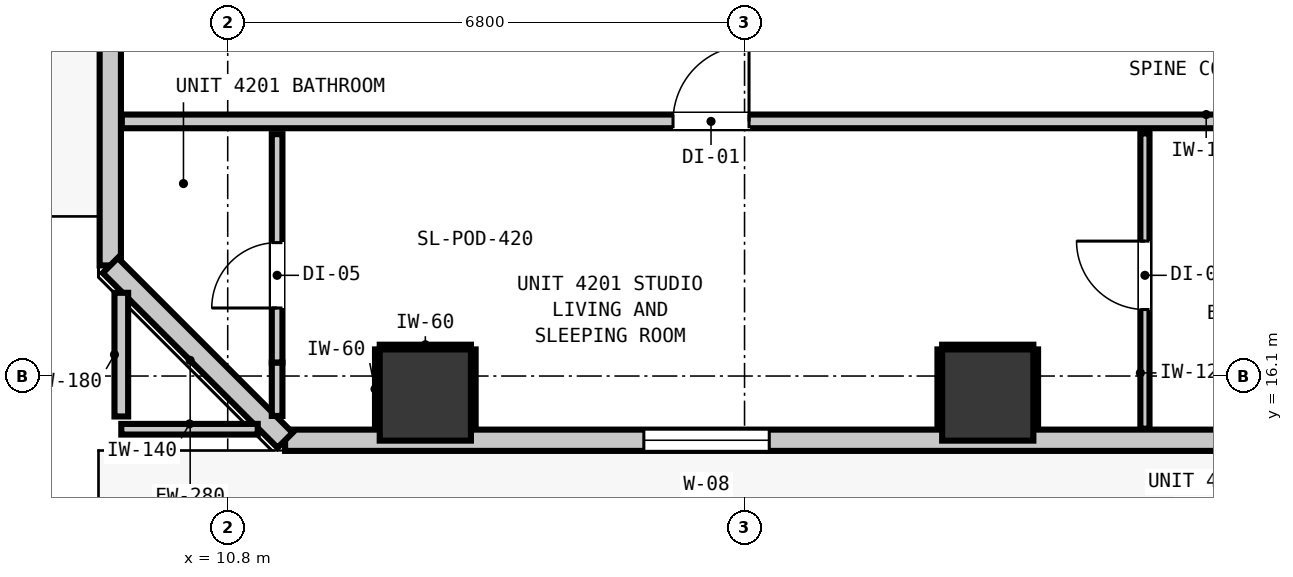
"""IFC4 building model, lengths in metres.
Left out: names, types, materials, properties, quantities, classifications, styles, units other than length and angle.
Written with IfcOpenShell. Run it as: python <this file> out.ifc"""

import sys

from ifc_helpers import new_model, si_unit, direction, frame, frame_2d, origin, origin_2d, place, context, subcontext, project, spatial, rectangle, extrude, element, fill, save


model = new_model("IFC4")
c1 = context("Model", 3, precision=1e-05, world=origin(), true_north=direction((0.0, 1.0)))
c2 = subcontext(c1, "Body", "Model", "MODEL_VIEW")
j1 = project(units=[si_unit("LENGTHUNIT", "METRE"), si_unit("PLANEANGLEUNIT", "RADIAN")], contexts=[c1])
p1 = place(None, origin())
s1 = spatial("IfcSite", under=j1, at=p1, CompositionType="ELEMENT")
p2 = place(p1, origin())
s2 = spatial("IfcBuilding", under=s1, at=p2, CompositionType="ELEMENT")
p3 = place(p2, frame((0.0, 0.0, 145.92)))
s3 = spatial("IfcBuildingStorey", under=s2, at=p3, CompositionType="ELEMENT", Elevation=145.92)
for number, where, z_axis, x_axis in (
    (1, (13.4, 15.85, -0.2), (0.0, 0.0, 1.0), (1.0, 0.0, 0.0)),
    (2, (20.8, 15.85, -0.2), (0.0, 0.0, 1.0), (1.0, 0.0, 0.0)),
):
    element("IfcColumn", number, at=place(p3, frame(where, z_axis=z_axis, x_axis=x_axis)), inside=s3, PredefinedType="COLUMN", context=c2, shape_type="SweptSolid", body=[
        extrude(rectangle(XDim=1.2, YDim=1.2, at=origin_2d()), origin(), (0.0, 0.0, 1.0), 3.52),
    ])
p4 = place(p3, frame((9.255, 17.555, 0.0), z_axis=(0.0, 0.0, 1.0), x_axis=(0.0, 1.0, 0.0)))
e3 = element("IfcWall", 3, at=p4, inside=s3, PredefinedType="STANDARD", context=c2, shape_type="SweptSolid", body=[
    extrude(rectangle(XDim=32.29, YDim=0.28, at=frame_2d((16.145, 0.0))), origin(), (0.0, 0.0, 1.0), 3.08),
])
p5 = place(p4, frame((5.467, 0.0, 0.0)))
e4 = element("IfcOpeningElement", 4, at=p5, cuts=e3, PredefinedType="OPENING", context=c2, shape_type="SweptSolid", body=[
    extrude(rectangle(XDim=1.0, YDim=2.15, at=frame_2d((0.5, 1.075))), frame((0.0, 0.15, 0.0), z_axis=(0.0, -1.0, 0.0), x_axis=(1.0, 0.0, 0.0)), (0.0, 0.0, 1.0), 0.3),
])
p6 = place(p4, frame((30.753, 0.0, 0.85)))
e5 = element("IfcOpeningElement", 5, at=p6, cuts=e3, PredefinedType="OPENING", context=c2, shape_type="SweptSolid", body=[
    extrude(rectangle(XDim=1.05, YDim=1.65, at=frame_2d((0.525, 0.825))), frame((0.0, 0.15, 0.0), z_axis=(0.0, -1.0, 0.0), x_axis=(1.0, 0.0, 0.0)), (0.0, 0.0, 1.0), 0.3),
])
p7 = place(p3, frame((46.645, 15.255, 0.0), z_axis=(0.0, 0.0, 1.0), x_axis=(-1.0, 0.0, 0.0)))
e6 = element("IfcWall", 6, at=p7, inside=s3, PredefinedType="STANDARD", context=c2, shape_type="SweptSolid", body=[
    extrude(rectangle(XDim=35.09, YDim=0.28, at=frame_2d((17.545, 0.0))), origin(), (0.0, 0.0, 1.0), 3.08),
])
p8 = place(p7, frame((0.503, 0.0, 0.0)))
e7 = element("IfcOpeningElement", 7, at=p8, cuts=e6, PredefinedType="OPENING", context=c2, shape_type="SweptSolid", body=[
    extrude(rectangle(XDim=1.1, YDim=2.15, at=frame_2d((0.55, 1.075))), frame((0.0, 0.15, 0.0), z_axis=(0.0, -1.0, 0.0), x_axis=(1.0, 0.0, 0.0)), (0.0, 0.0, 1.0), 0.3),
])
p9 = place(p7, frame((28.72, 0.0, 0.85)))
e8 = element("IfcOpeningElement", 8, at=p9, cuts=e6, PredefinedType="OPENING", context=c2, shape_type="SweptSolid", body=[
    extrude(rectangle(XDim=1.65, YDim=1.75, at=frame_2d((0.825, 0.875))), frame((0.0, 0.15, 0.0), z_axis=(0.0, -1.0, 0.0), x_axis=(1.0, 0.0, 0.0)), (0.0, 0.0, 1.0), 0.3),
])
p10 = place(p7, frame((14.635, 0.0, 0.85)))
e9 = element("IfcOpeningElement", 9, at=p10, cuts=e6, PredefinedType="OPENING", context=c2, shape_type="SweptSolid", body=[
    extrude(rectangle(XDim=1.65, YDim=1.75, at=frame_2d((0.825, 0.875))), frame((0.0, 0.15, 0.0), z_axis=(0.0, -1.0, 0.0), x_axis=(1.0, 0.0, 0.0)), (0.0, 0.0, 1.0), 0.3),
])
p11 = place(p7, frame((4.309, 0.0, 0.85)))
e10 = element("IfcOpeningElement", 10, at=p11, cuts=e6, PredefinedType="OPENING", context=c2, shape_type="SweptSolid", body=[
    extrude(rectangle(XDim=1.65, YDim=1.75, at=frame_2d((0.825, 0.875))), frame((0.0, 0.15, 0.0), z_axis=(0.0, -1.0, 0.0), x_axis=(1.0, 0.0, 0.0)), (0.0, 0.0, 1.0), 0.3),
])
p12 = place(p3, frame((11.555, 15.255, 0.0), z_axis=(0.0, 0.0, 1.0), x_axis=(-0.707106781187, 0.707106781187, 0.0)))
e11 = element("IfcWall", 11, at=p12, inside=s3, PredefinedType="STANDARD", context=c2, shape_type="SweptSolid", body=[
    extrude(rectangle(XDim=3.253, YDim=0.28, at=frame_2d((1.626, 0.0))), origin(), (0.0, 0.0, 1.0), 3.08),
])
p13 = place(p3, frame((9.407, 19.45, 0.0), z_axis=(0.0, 0.0, 1.0), x_axis=(1.0, 0.0, 0.0)))
e12 = element("IfcWall", 12, at=p13, inside=s3, PredefinedType="PARTITIONING", context=c2, shape_type="SweptSolid", body=[
    extrude(rectangle(XDim=27.532, YDim=0.18, at=frame_2d((13.766, 0.0))), origin(), (0.0, 0.0, 1.0), 3.08),
])
p14 = place(p13, frame((7.252, 0.0, 0.0)))
e13 = element("IfcOpeningElement", 13, at=p14, cuts=e12, PredefinedType="OPENING", context=c2, shape_type="SweptSolid", body=[
    extrude(rectangle(XDim=1.0, YDim=2.15, at=frame_2d((0.5, 1.075))), frame((0.0, 0.1, 0.0), z_axis=(0.0, -1.0, 0.0), x_axis=(1.0, 0.0, 0.0)), (0.0, 0.0, 1.0), 0.2),
])
p15 = place(p13, frame((20.282, 0.0, 0.0)))
e14 = element("IfcOpeningElement", 14, at=p15, cuts=e12, PredefinedType="OPENING", context=c2, shape_type="SweptSolid", body=[
    extrude(rectangle(XDim=1.0, YDim=2.15, at=frame_2d((0.5, 1.075))), frame((0.0, 0.1, 0.0), z_axis=(0.0, -1.0, 0.0), x_axis=(1.0, 0.0, 0.0)), (0.0, 0.0, 1.0), 0.2),
])
p16 = place(p3, frame((9.4, 15.4, 0.0), z_axis=(0.0, 0.0, 1.0), x_axis=(1.0, 0.0, 0.0)))
e15 = element("IfcWall", 15, at=p16, inside=s3, PredefinedType="PARTITIONING", context=c2, shape_type="SweptSolid", body=[
    extrude(rectangle(XDim=1.795, YDim=0.14, at=frame_2d((0.897, 0.0))), origin(), (0.0, 0.0, 1.0), 3.08),
])
p17 = place(p3, frame((9.4, 15.568, 0.0), z_axis=(0.0, 0.0, 1.0), x_axis=(0.0, 1.0, 0.0)))
e16 = element("IfcWall", 16, at=p17, inside=s3, PredefinedType="PARTITIONING", context=c2, shape_type="SweptSolid", body=[
    extrude(rectangle(XDim=1.627, YDim=0.18, at=frame_2d((0.813, 0.0))), origin(), (0.0, 0.0, 1.0), 3.08),
])
p18 = place(p3, frame((11.45, 15.575, 0.0), z_axis=(0.0, 0.0, 1.0), x_axis=(0.0, 1.0, 0.0)))
e17 = element("IfcWall", 17, at=p18, inside=s3, PredefinedType="PARTITIONING", context=c2, shape_type="SweptSolid", body=[
    extrude(rectangle(XDim=0.703, YDim=0.14, at=frame_2d((0.352, 0.0))), origin(), (0.0, 0.0, 1.0), 3.08),
])
p19 = place(p3, frame((11.45, 16.278, 0.0), z_axis=(0.0, 0.0, 1.0), x_axis=(0.0, 1.0, 0.0)))
e18 = element("IfcWall", 18, at=p19, inside=s3, PredefinedType="PARTITIONING", context=c2, shape_type="SweptSolid", body=[
    extrude(rectangle(XDim=3.004, YDim=0.14, at=frame_2d((1.502, 0.0))), origin(), (0.0, 0.0, 1.0), 2.565),
])
p20 = place(p19, frame((0.717, 0.0, 0.0)))
e19 = element("IfcOpeningElement", 19, at=p20, cuts=e18, PredefinedType="OPENING", context=c2, shape_type="SweptSolid", body=[
    extrude(rectangle(XDim=0.86, YDim=2.02, at=frame_2d((0.43, 1.01))), frame((0.0, 0.08, 0.0), z_axis=(0.0, -1.0, 0.0), x_axis=(1.0, 0.0, 0.0)), (0.0, 0.0, 1.0), 0.16),
])
p21 = place(p3, frame((22.868, 15.407, 0.0), z_axis=(0.0, 0.0, 1.0), x_axis=(0.0, 1.0, 0.0)))
e20 = element("IfcWall", 20, at=p21, inside=s3, PredefinedType="PARTITIONING", context=c2, shape_type="SweptSolid", body=[
    extrude(rectangle(XDim=3.885, YDim=0.12, at=frame_2d((1.942, 0.0))), origin(), (0.0, 0.0, 1.0), 3.08),
])
p22 = place(p21, frame((1.568, 0.0, 0.0)))
e21 = element("IfcOpeningElement", 21, at=p22, cuts=e20, PredefinedType="OPENING", context=c2, shape_type="SweptSolid", body=[
    extrude(rectangle(XDim=0.9, YDim=2.1, at=frame_2d((0.45, 1.05))), frame((0.0, 0.07, 0.0), z_axis=(0.0, -1.0, 0.0), x_axis=(1.0, 0.0, 0.0)), (0.0, 0.0, 1.0), 0.14),
])
p23 = place(p3, frame((12.8, 16.482, 0.0), z_axis=(0.0, 0.0, 1.0), x_axis=(1.0, 0.0, 0.0)))
e22 = element("IfcWall", 22, at=p23, inside=s3, PredefinedType="PARTITIONING", context=c2, shape_type="SweptSolid", body=[
    extrude(rectangle(XDim=1.2, YDim=0.06, at=frame_2d((0.6, 0.0))), origin(), (0.0, 0.0, 1.0), 1.45),
])
for number, where, z_axis, x_axis in (
    (23, (12.768, 15.41, 0.0), (0.0, 0.0, 1.0), (0.0, 1.0, 0.0)),
    (24, (14.032, 15.41, 0.0), (0.0, 0.0, 1.0), (0.0, 1.0, 0.0)),
):
    element("IfcWall", number, at=place(p3, frame(where, z_axis=z_axis, x_axis=x_axis)), inside=s3, PredefinedType="PARTITIONING", context=c2, shape_type="SweptSolid", body=[
        extrude(rectangle(XDim=1.04, YDim=0.06, at=frame_2d((0.52, 0.0))), origin(), (0.0, 0.0, 1.0), 1.45),
    ])
p24 = place(p3, frame((20.2, 16.482, 0.0), z_axis=(0.0, 0.0, 1.0), x_axis=(1.0, 0.0, 0.0)))
e25 = element("IfcWall", 25, at=p24, inside=s3, PredefinedType="PARTITIONING", context=c2, shape_type="SweptSolid", body=[
    extrude(rectangle(XDim=1.2, YDim=0.06, at=frame_2d((0.6, 0.0))), origin(), (0.0, 0.0, 1.0), 1.45),
])
for number, where, z_axis, x_axis in (
    (26, (20.168, 15.41, 0.0), (0.0, 0.0, 1.0), (0.0, 1.0, 0.0)),
    (27, (21.432, 15.41, 0.0), (0.0, 0.0, 1.0), (0.0, 1.0, 0.0)),
):
    element("IfcWall", number, at=place(p3, frame(where, z_axis=z_axis, x_axis=x_axis)), inside=s3, PredefinedType="PARTITIONING", context=c2, shape_type="SweptSolid", body=[
        extrude(rectangle(XDim=1.04, YDim=0.06, at=frame_2d((0.52, 0.0))), origin(), (0.0, 0.0, 1.0), 1.45),
    ])
p25 = place(p9, origin())
e28 = element("IfcWindow", 28, at=p25, inside=s3, PartitioningType="SINGLE_PANEL", PredefinedType="WINDOW", context=c2, shape_type="SweptSolid", body=[
    extrude(rectangle(XDim=1.65, YDim=1.75, at=frame_2d((0.825, 0.875))), frame((0.0, 0.03, 0.0), z_axis=(0.0, -1.0, 0.0), x_axis=(1.0, 0.0, 0.0)), (0.0, 0.0, 1.0), 0.06),
])
fill(e8, e28)
p26 = place(p14, origin())
e29 = element("IfcDoor", 29, at=p26, inside=s3, OperationType="SINGLE_SWING_RIGHT", PredefinedType="DOOR", context=c2, shape_type="SweptSolid", body=[
    extrude(rectangle(XDim=1.0, YDim=2.15, at=frame_2d((0.5, 1.075))), frame((0.0, 0.025, 0.0), z_axis=(0.0, -1.0, 0.0), x_axis=(1.0, 0.0, 0.0)), (0.0, 0.0, 1.0), 0.05),
])
fill(e13, e29)
p27 = place(p20, origin())
e30 = element("IfcDoor", 30, at=p27, inside=s3, OperationType="SINGLE_SWING_LEFT", PredefinedType="DOOR", context=c2, shape_type="SweptSolid", body=[
    extrude(rectangle(XDim=0.86, YDim=2.02, at=frame_2d((0.43, 1.01))), frame((0.0, 0.025, 0.0), z_axis=(0.0, -1.0, 0.0), x_axis=(1.0, 0.0, 0.0)), (0.0, 0.0, 1.0), 0.05),
])
fill(e19, e30)
p28 = place(p22, origin())
e31 = element("IfcDoor", 31, at=p28, inside=s3, OperationType="SINGLE_SWING_RIGHT", PredefinedType="DOOR", context=c2, shape_type="SweptSolid", body=[
    extrude(rectangle(XDim=0.9, YDim=2.1, at=frame_2d((0.45, 1.05))), frame((0.0, 0.025, 0.0), z_axis=(0.0, -1.0, 0.0), x_axis=(1.0, 0.0, 0.0)), (0.0, 0.0, 1.0), 0.05),
])
fill(e21, e31)
save(model, sys.argv[1])
